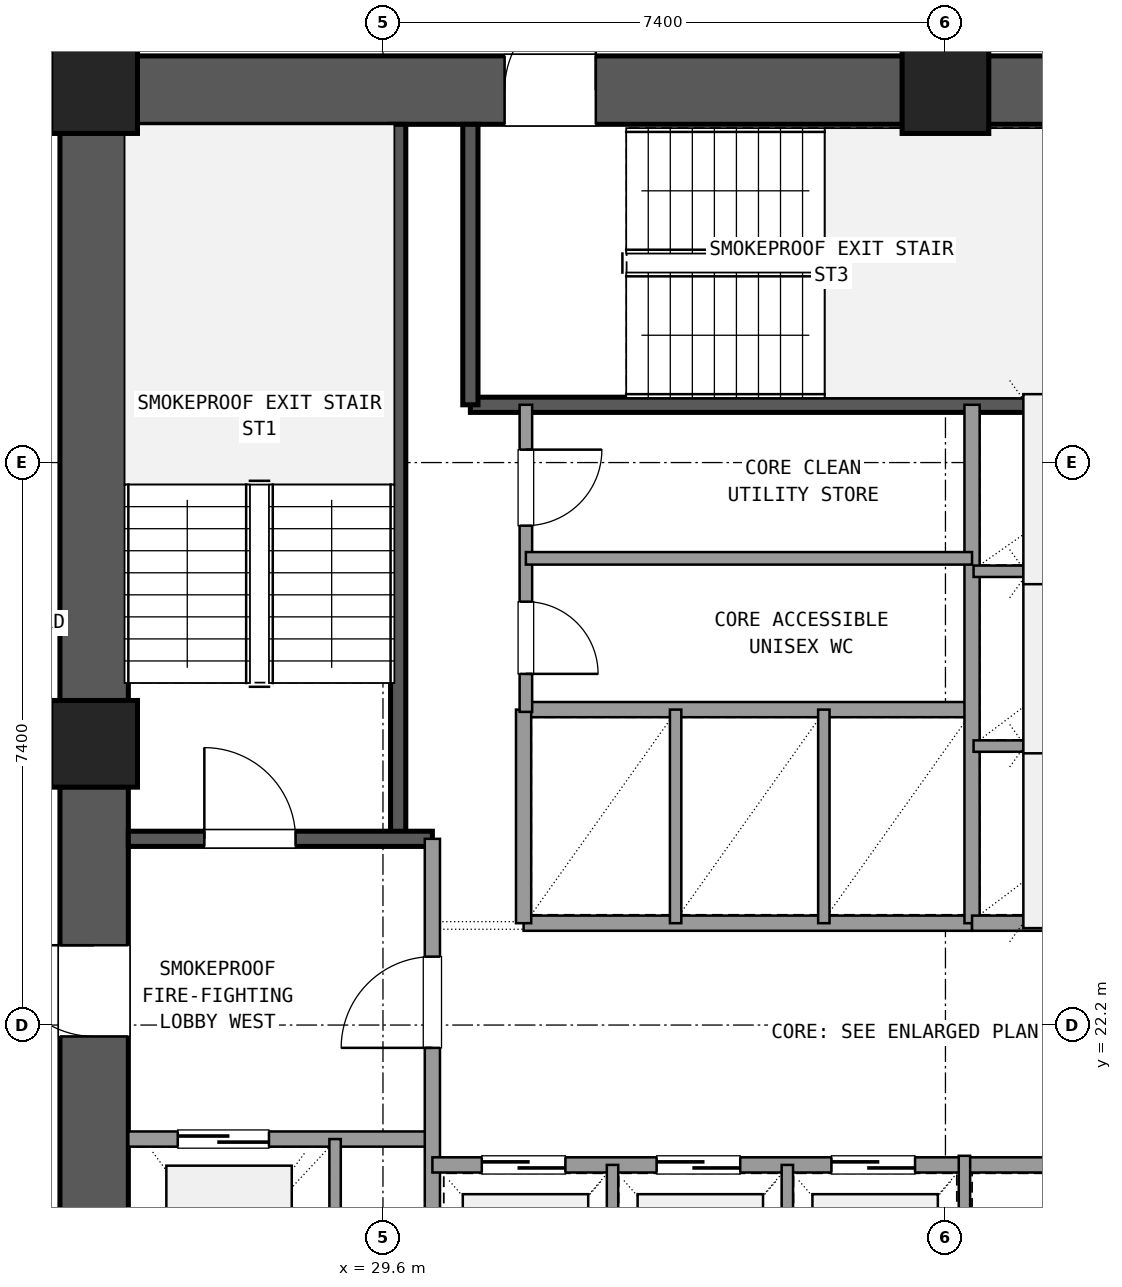
"""IFC4 building model, lengths in metres.
Left out: names, types, materials, properties, quantities, classifications, styles, units other than length and angle.
Written with IfcOpenShell. Run it as: python <this file> out.ifc"""

import sys

from ifc_helpers import new_model, si_unit, direction, frame, frame_2d, origin, origin_2d, place, context, subcontext, project, spatial, rectangle, extrude, element, fill, save


model = new_model("IFC4")
c1 = context("Model", 3, precision=1e-05, world=origin(), true_north=direction((0.0, 1.0)))
c2 = subcontext(c1, "Body", "Model", "MODEL_VIEW")
j1 = project(units=[si_unit("LENGTHUNIT", "METRE"), si_unit("PLANEANGLEUNIT", "RADIAN")], contexts=[c1])
p1 = place(None, origin())
s1 = spatial("IfcSite", under=j1, at=p1, CompositionType="ELEMENT")
p2 = place(p1, origin())
s2 = spatial("IfcBuilding", under=s1, at=p2, CompositionType="ELEMENT")
p3 = place(p2, frame((0.0, 0.0, 34.74)))
s3 = spatial("IfcBuildingStorey", under=s2, at=p3, CompositionType="ELEMENT", Elevation=34.74)
for number, where, z_axis, x_axis in (
    (1, (37.0, 34.5, 0.0), (0.0, 0.0, 1.0), (1.0, 0.0, 0.0)),
    (2, (25.8, 34.5, 0.0), (0.0, 0.0, 1.0), (1.0, 0.0, 0.0)),
    (3, (25.8, 25.9, 0.0), (0.0, 0.0, 1.0), (1.0, 0.0, 0.0)),
):
    element("IfcColumn", number, at=place(p3, frame(where, z_axis=z_axis, x_axis=x_axis)), inside=s3, PredefinedType="COLUMN", context=c2, shape_type="SweptSolid", body=[
        extrude(rectangle(XDim=1.14, YDim=1.14, at=origin_2d()), origin(), (0.0, 0.0, 1.0), 3.6),
    ])
p4 = place(p3, frame((47.635, 34.5, 0.0), z_axis=(0.0, 0.0, 1.0), x_axis=(-1.0, 0.0, 0.0)))
e4 = element("IfcWall", 4, at=p4, inside=s3, PredefinedType="SHEAR", context=c2, shape_type="SweptSolid", body=[
    extrude(rectangle(XDim=10.07, YDim=0.9, at=frame_2d((5.035, 0.0))), origin(), (0.0, 0.0, 1.0), 3.32),
])
p5 = place(p4, frame((4.535, 0.0, 0.0)))
e5 = element("IfcOpeningElement", 5, at=p5, cuts=e4, PredefinedType="OPENING", context=c2, shape_type="SweptSolid", body=[
    extrude(rectangle(XDim=1.6, YDim=2.2, at=frame_2d((0.8, 1.1))), frame((0.0, 0.46, 0.0), z_axis=(0.0, -1.0, 0.0), x_axis=(1.0, 0.0, 0.0)), (0.0, 0.0, 1.0), 0.92),
])
p6 = place(p3, frame((36.435, 34.5, 0.0), z_axis=(0.0, 0.0, 1.0), x_axis=(-1.0, 0.0, 0.0)))
e6 = element("IfcWall", 6, at=p6, inside=s3, PredefinedType="SHEAR", context=c2, shape_type="SweptSolid", body=[
    extrude(rectangle(XDim=10.07, YDim=0.9, at=frame_2d((5.035, 0.0))), origin(), (0.0, 0.0, 1.0), 3.32),
])
p7 = place(p6, frame((4.035, 0.0, 0.0)))
e7 = element("IfcOpeningElement", 7, at=p7, cuts=e6, PredefinedType="OPENING", context=c2, shape_type="SweptSolid", body=[
    extrude(rectangle(XDim=1.2, YDim=2.15, at=frame_2d((0.6, 1.075))), frame((0.0, 0.46, 0.0), z_axis=(0.0, -1.0, 0.0), x_axis=(1.0, 0.0, 0.0)), (0.0, 0.0, 1.0), 0.92),
])
p8 = place(p3, frame((25.8, 33.935, 0.0), z_axis=(0.0, 0.0, 1.0), x_axis=(0.0, -1.0, 0.0)))
e8 = element("IfcWall", 8, at=p8, inside=s3, PredefinedType="SHEAR", context=c2, shape_type="SweptSolid", body=[
    extrude(rectangle(XDim=7.47, YDim=0.9, at=frame_2d((3.735, 0.0))), origin(), (0.0, 0.0, 1.0), 3.32),
])
p9 = place(p3, frame((25.8, 25.335, 0.0), z_axis=(0.0, 0.0, 1.0), x_axis=(0.0, -1.0, 0.0)))
e9 = element("IfcWall", 9, at=p9, inside=s3, PredefinedType="SHEAR", context=c2, shape_type="SweptSolid", body=[
    extrude(rectangle(XDim=7.47, YDim=0.9, at=frame_2d((3.735, 0.0))), origin(), (0.0, 0.0, 1.0), 3.32),
])
p10 = place(p9, frame((2.085, 0.0, 0.0)))
e10 = element("IfcOpeningElement", 10, at=p10, cuts=e9, PredefinedType="OPENING", context=c2, shape_type="SweptSolid", body=[
    extrude(rectangle(XDim=1.2, YDim=2.15, at=frame_2d((0.6, 1.075))), frame((0.0, 0.46, 0.0), z_axis=(0.0, -1.0, 0.0), x_axis=(1.0, 0.0, 0.0)), (0.0, 0.0, 1.0), 0.92),
])
p11 = place(p3, frame((29.8, 24.65, 0.0), z_axis=(0.0, 0.0, 1.0), x_axis=(0.0, 1.0, 0.0)))
e11 = element("IfcWall", 11, at=p11, inside=s3, PredefinedType="SHEAR", context=c2, shape_type="SweptSolid", body=[
    extrude(rectangle(XDim=9.4, YDim=0.2, at=frame_2d((4.7, 0.0))), origin(), (0.0, 0.0, 1.0), 3.32),
])
p12 = place(p3, frame((26.25, 24.65, 0.0), z_axis=(0.0, 0.0, 1.0), x_axis=(1.0, 0.0, 0.0)))
e12 = element("IfcWall", 12, at=p12, inside=s3, PredefinedType="SHEAR", context=c2, shape_type="SweptSolid", body=[
    extrude(rectangle(XDim=4.0, YDim=0.2, at=frame_2d((2.0, 0.0))), origin(), (0.0, 0.0, 1.0), 3.32),
])
p13 = place(p12, frame((1.0, 0.0, 0.0)))
e13 = element("IfcOpeningElement", 13, at=p13, cuts=e12, PredefinedType="OPENING", context=c2, shape_type="SweptSolid", body=[
    extrude(rectangle(XDim=1.2, YDim=2.15, at=frame_2d((0.6, 1.075))), frame((0.0, 0.11, 0.0), z_axis=(0.0, -1.0, 0.0), x_axis=(1.0, 0.0, 0.0)), (0.0, 0.0, 1.0), 0.22),
])
p14 = place(p3, frame((30.75, 30.36, 0.0), z_axis=(0.0, 0.0, 1.0), x_axis=(1.0, 0.0, 0.0)))
e14 = element("IfcWall", 14, at=p14, inside=s3, PredefinedType="SHEAR", context=c2, shape_type="SweptSolid", body=[
    extrude(rectangle(XDim=9.5, YDim=0.2, at=frame_2d((4.75, 0.0))), origin(), (0.0, 0.0, 1.0), 3.32),
])
p15 = place(p3, frame((30.75, 30.36, 0.0), z_axis=(0.0, 0.0, 1.0), x_axis=(0.0, 1.0, 0.0)))
e15 = element("IfcWall", 15, at=p15, inside=s3, PredefinedType="SHEAR", context=c2, shape_type="SweptSolid", body=[
    extrude(rectangle(XDim=3.69, YDim=0.2, at=frame_2d((1.845, 0.0))), origin(), (0.0, 0.0, 1.0), 3.32),
])
p16 = place(p3, frame((26.25, 20.7, 0.0), z_axis=(0.0, 0.0, 1.0), x_axis=(1.0, 0.0, 0.0)))
e16 = element("IfcWall", 16, at=p16, inside=s3, PredefinedType="SOLIDWALL", context=c2, shape_type="SweptSolid", body=[
    extrude(rectangle(XDim=4.0, YDim=0.2, at=frame_2d((2.0, 0.0))), origin(), (0.0, 0.0, 1.0), 2.61),
])
p17 = place(p16, frame((0.65, 0.0, 0.0)))
e17 = element("IfcOpeningElement", 17, at=p17, cuts=e16, PredefinedType="OPENING", context=c2, shape_type="SweptSolid", body=[
    extrude(rectangle(XDim=1.2, YDim=2.15, at=frame_2d((0.6, 1.075))), frame((0.0, 0.11, 0.0), z_axis=(0.0, -1.0, 0.0), x_axis=(1.0, 0.0, 0.0)), (0.0, 0.0, 1.0), 0.22),
])
p18 = place(p3, frame((30.25, 17.75, 0.0), z_axis=(0.0, 0.0, 1.0), x_axis=(0.0, 1.0, 0.0)))
e18 = element("IfcWall", 18, at=p18, inside=s3, PredefinedType="SOLIDWALL", context=c2, shape_type="SweptSolid", body=[
    extrude(rectangle(XDim=6.9, YDim=0.2, at=frame_2d((3.45, 0.0))), origin(), (0.0, 0.0, 1.0), 2.61),
])
p19 = place(p18, frame((4.15, 0.0, 0.0)))
e19 = element("IfcOpeningElement", 19, at=p19, cuts=e18, PredefinedType="OPENING", context=c2, shape_type="SweptSolid", body=[
    extrude(rectangle(XDim=1.2, YDim=2.15, at=frame_2d((0.6, 1.075))), frame((0.0, 0.11, 0.0), z_axis=(0.0, -1.0, 0.0), x_axis=(1.0, 0.0, 0.0)), (0.0, 0.0, 1.0), 0.22),
])
p20 = place(p3, frame((28.97, 17.75, 0.0), z_axis=(0.0, 0.0, 1.0), x_axis=(0.0, 1.0, 0.0)))
e20 = element("IfcWall", 20, at=p20, inside=s3, PredefinedType="PARTITIONING", context=c2, shape_type="SweptSolid", body=[
    extrude(rectangle(XDim=2.95, YDim=0.15, at=frame_2d((1.475, 0.0))), origin(), (0.0, 0.0, 1.0), 2.61),
])
p21 = place(p3, frame((30.25, 20.36, 0.0), z_axis=(0.0, 0.0, 1.0), x_axis=(1.0, 0.0, 0.0)))
e21 = element("IfcWall", 21, at=p21, inside=s3, PredefinedType="SOLIDWALL", context=c2, shape_type="SweptSolid", body=[
    extrude(rectangle(XDim=7.0, YDim=0.2, at=frame_2d((3.5, 0.0))), origin(), (0.0, 0.0, 1.0), 2.61),
])
p22 = place(p21, frame((0.65, 0.0, 0.0)))
e22 = element("IfcOpeningElement", 22, at=p22, cuts=e21, PredefinedType="OPENING", context=c2, shape_type="SweptSolid", body=[
    extrude(rectangle(XDim=1.1, YDim=2.15, at=frame_2d((0.55, 1.075))), frame((0.0, 0.11, 0.0), z_axis=(0.0, -1.0, 0.0), x_axis=(1.0, 0.0, 0.0)), (0.0, 0.0, 1.0), 0.22),
])
p23 = place(p21, frame((2.95, 0.0, 0.0)))
e23 = element("IfcOpeningElement", 23, at=p23, cuts=e21, PredefinedType="OPENING", context=c2, shape_type="SweptSolid", body=[
    extrude(rectangle(XDim=1.1, YDim=2.15, at=frame_2d((0.55, 1.075))), frame((0.0, 0.11, 0.0), z_axis=(0.0, -1.0, 0.0), x_axis=(1.0, 0.0, 0.0)), (0.0, 0.0, 1.0), 0.22),
])
p24 = place(p21, frame((5.25, 0.0, 0.0)))
e24 = element("IfcOpeningElement", 24, at=p24, cuts=e21, PredefinedType="OPENING", context=c2, shape_type="SweptSolid", body=[
    extrude(rectangle(XDim=1.1, YDim=2.15, at=frame_2d((0.55, 1.075))), frame((0.0, 0.11, 0.0), z_axis=(0.0, -1.0, 0.0), x_axis=(1.0, 0.0, 0.0)), (0.0, 0.0, 1.0), 0.22),
])
for number, where, z_axis, x_axis in (
    (25, (32.62, 17.75, 0.0), (0.0, 0.0, 1.0), (0.0, 1.0, 0.0)),
    (26, (34.92, 17.75, 0.0), (0.0, 0.0, 1.0), (0.0, 1.0, 0.0)),
):
    element("IfcWall", number, at=place(p3, frame(where, z_axis=z_axis, x_axis=x_axis)), inside=s3, PredefinedType="PARTITIONING", context=c2, shape_type="SweptSolid", body=[
        extrude(rectangle(XDim=2.61, YDim=0.15, at=frame_2d((1.305, 0.0))), origin(), (0.0, 0.0, 1.0), 2.61),
    ])
p25 = place(p3, frame((37.25, 20.36, 0.0), z_axis=(0.0, 0.0, 1.0), x_axis=(1.0, 0.0, 0.0)))
e27 = element("IfcWall", 27, at=p25, inside=s3, PredefinedType="SOLIDWALL", context=c2, shape_type="SweptSolid", body=[
    extrude(rectangle(XDim=6.1, YDim=0.2, at=frame_2d((3.05, 0.0))), origin(), (0.0, 0.0, 1.0), 2.61),
])
p26 = place(p3, frame((37.25, 17.75, 0.0), z_axis=(0.0, 0.0, 1.0), x_axis=(0.0, 1.0, 0.0)))
e28 = element("IfcWall", 28, at=p26, inside=s3, PredefinedType="PARTITIONING", context=c2, shape_type="SweptSolid", body=[
    extrude(rectangle(XDim=2.73, YDim=0.15, at=frame_2d((1.365, 0.0))), origin(), (0.0, 0.0, 1.0), 2.61),
])
for number, where, z_axis, x_axis in (
    (29, (31.45, 23.54, 0.0), (0.0, 0.0, 1.0), (1.0, 0.0, 0.0)),
    (30, (31.45, 26.35, 0.0), (0.0, 0.0, 1.0), (1.0, 0.0, 0.0)),
):
    element("IfcWall", number, at=place(p3, frame(where, z_axis=z_axis, x_axis=x_axis)), inside=s3, PredefinedType="SOLIDWALL", context=c2, shape_type="SweptSolid", body=[
        extrude(rectangle(XDim=5.9, YDim=0.2, at=frame_2d((2.95, 0.0))), origin(), (0.0, 0.0, 1.0), 2.61),
    ])
p27 = place(p3, frame((31.45, 23.54, 0.0), z_axis=(0.0, 0.0, 1.0), x_axis=(0.0, 1.0, 0.0)))
e31 = element("IfcWall", 31, at=p27, inside=s3, PredefinedType="SOLIDWALL", context=c2, shape_type="SweptSolid", body=[
    extrude(rectangle(XDim=2.81, YDim=0.2, at=frame_2d((1.405, 0.0))), origin(), (0.0, 0.0, 1.0), 2.61),
])
for number, where, z_axis, x_axis in (
    (32, (33.45, 23.54, 0.0), (0.0, 0.0, 1.0), (0.0, 1.0, 0.0)),
    (33, (35.4, 23.54, 0.0), (0.0, 0.0, 1.0), (0.0, 1.0, 0.0)),
):
    element("IfcWall", number, at=place(p3, frame(where, z_axis=z_axis, x_axis=x_axis)), inside=s3, PredefinedType="PARTITIONING", context=c2, shape_type="SweptSolid", body=[
        extrude(rectangle(XDim=2.81, YDim=0.15, at=frame_2d((1.405, 0.0))), origin(), (0.0, 0.0, 1.0), 2.61),
    ])
p28 = place(p3, frame((37.35, 23.54, 0.0), z_axis=(0.0, 0.0, 1.0), x_axis=(0.0, 1.0, 0.0)))
e34 = element("IfcWall", 34, at=p28, inside=s3, PredefinedType="SOLIDWALL", context=c2, shape_type="SweptSolid", body=[
    extrude(rectangle(XDim=6.82, YDim=0.2, at=frame_2d((3.41, 0.0))), origin(), (0.0, 0.0, 1.0), 2.61),
])
p29 = place(p3, frame((37.35, 23.54, 0.0), z_axis=(0.0, 0.0, 1.0), x_axis=(1.0, 0.0, 0.0)))
e35 = element("IfcWall", 35, at=p29, inside=s3, PredefinedType="SOLIDWALL", context=c2, shape_type="SweptSolid", body=[
    extrude(rectangle(XDim=3.05, YDim=0.2, at=frame_2d((1.525, 0.0))), origin(), (0.0, 0.0, 1.0), 2.61),
])
for number, where, z_axis, x_axis in (
    (36, (37.37, 25.87, 0.0), (0.0, 0.0, 1.0), (1.0, 0.0, 0.0)),
    (37, (37.37, 28.17, 0.0), (0.0, 0.0, 1.0), (1.0, 0.0, 0.0)),
):
    element("IfcWall", number, at=place(p3, frame(where, z_axis=z_axis, x_axis=x_axis)), inside=s3, PredefinedType="PARTITIONING", context=c2, shape_type="SweptSolid", body=[
        extrude(rectangle(XDim=3.01, YDim=0.15, at=frame_2d((1.505, 0.0))), origin(), (0.0, 0.0, 1.0), 2.61),
    ])
p30 = place(p3, frame((31.48, 26.32, 0.0), z_axis=(0.0, 0.0, 1.0), x_axis=(0.0, 1.0, 0.0)))
e38 = element("IfcWall", 38, at=p30, inside=s3, PredefinedType="PLUMBINGWALL", context=c2, shape_type="SweptSolid", body=[
    extrude(rectangle(XDim=4.04, YDim=0.165, at=frame_2d((2.02, 0.0))), origin(), (0.0, 0.0, 1.0), 2.61),
])
p31 = place(p30, frame((0.5, 0.0, 0.0)))
e39 = element("IfcOpeningElement", 39, at=p31, cuts=e38, PredefinedType="OPENING", context=c2, shape_type="SweptSolid", body=[
    extrude(rectangle(XDim=0.95, YDim=2.1, at=frame_2d((0.475, 1.05))), frame((0.0, 0.093, 0.0), z_axis=(0.0, -1.0, 0.0), x_axis=(1.0, 0.0, 0.0)), (0.0, 0.0, 1.0), 0.185),
])
p32 = place(p30, frame((2.45, 0.0, 0.0)))
e40 = element("IfcOpeningElement", 40, at=p32, cuts=e38, PredefinedType="OPENING", context=c2, shape_type="SweptSolid", body=[
    extrude(rectangle(XDim=1.0, YDim=2.15, at=frame_2d((0.5, 1.075))), frame((0.0, 0.093, 0.0), z_axis=(0.0, -1.0, 0.0), x_axis=(1.0, 0.0, 0.0)), (0.0, 0.0, 1.0), 0.185),
])
p33 = place(p3, frame((31.48, 28.34, 0.0), z_axis=(0.0, 0.0, 1.0), x_axis=(1.0, 0.0, 0.0)))
e41 = element("IfcWall", 41, at=p33, inside=s3, PredefinedType="PLUMBINGWALL", context=c2, shape_type="SweptSolid", body=[
    extrude(rectangle(XDim=5.87, YDim=0.165, at=frame_2d((2.935, 0.0))), origin(), (0.0, 0.0, 1.0), 2.61),
])
p34 = place(p3, frame((37.0, 34.95, 0.0), z_axis=(0.0, 0.0, 1.0), x_axis=(0.0, 1.0, 0.0)))
e42 = element("IfcWall", 42, at=p34, inside=s3, PredefinedType="PARTITIONING", context=c2, shape_type="SweptSolid", body=[
    extrude(rectangle(XDim=2.7, YDim=0.18, at=frame_2d((1.35, 0.0))), origin(), (0.0, 0.0, 1.0), 2.61),
])
p35 = place(p34, frame((0.35, 0.0, 0.0)))
e43 = element("IfcOpeningElement", 43, at=p35, cuts=e42, PredefinedType="OPENING", context=c2, shape_type="SweptSolid", body=[
    extrude(rectangle(XDim=2.0, YDim=2.2, at=frame_2d((1.0, 1.1))), frame((0.0, 0.1, 0.0), z_axis=(0.0, -1.0, 0.0), x_axis=(1.0, 0.0, 0.0)), (0.0, 0.0, 1.0), 0.2),
])
p36 = place(p13, origin())
e44 = element("IfcDoor", 44, at=p36, inside=s3, OperationType="SINGLE_SWING_LEFT", PredefinedType="DOOR", context=c2, shape_type="SweptSolid", body=[
    extrude(rectangle(XDim=1.2, YDim=2.15, at=frame_2d((0.6, 1.075))), frame((0.0, 0.025, 0.0), z_axis=(0.0, -1.0, 0.0), x_axis=(1.0, 0.0, 0.0)), (0.0, 0.0, 1.0), 0.05),
])
fill(e13, e44)
p37 = place(p17, origin())
e45 = element("IfcDoor", 45, at=p37, inside=s3, OperationType="SLIDING_TO_LEFT", PredefinedType="DOOR", context=c2, shape_type="SweptSolid", body=[
    extrude(rectangle(XDim=1.2, YDim=2.15, at=frame_2d((0.6, 1.075))), frame((0.0, 0.025, 0.0), z_axis=(0.0, -1.0, 0.0), x_axis=(1.0, 0.0, 0.0)), (0.0, 0.0, 1.0), 0.05),
])
fill(e17, e45)
p38 = place(p19, origin())
e46 = element("IfcDoor", 46, at=p38, inside=s3, OperationType="SINGLE_SWING_LEFT", PredefinedType="DOOR", context=c2, shape_type="SweptSolid", body=[
    extrude(rectangle(XDim=1.2, YDim=2.15, at=frame_2d((0.6, 1.075))), frame((0.0, 0.025, 0.0), z_axis=(0.0, -1.0, 0.0), x_axis=(1.0, 0.0, 0.0)), (0.0, 0.0, 1.0), 0.05),
])
fill(e19, e46)
p39 = place(p10, frame((1.2, 0.0, 0.0), z_axis=(0.0, 0.0, 1.0), x_axis=(-1.0, 0.0, 0.0)))
e47 = element("IfcDoor", 47, at=p39, inside=s3, OperationType="SINGLE_SWING_LEFT", PredefinedType="DOOR", context=c2, shape_type="SweptSolid", body=[
    extrude(rectangle(XDim=1.2, YDim=2.15, at=frame_2d((0.6, 1.075))), frame((0.0, 0.025, 0.0), z_axis=(0.0, -1.0, 0.0), x_axis=(1.0, 0.0, 0.0)), (0.0, 0.0, 1.0), 0.05),
])
fill(e10, e47)
p40 = place(p7, frame((1.2, 0.0, 0.0), z_axis=(0.0, 0.0, 1.0), x_axis=(-1.0, 0.0, 0.0)))
e48 = element("IfcDoor", 48, at=p40, inside=s3, OperationType="SINGLE_SWING_LEFT", PredefinedType="DOOR", context=c2, shape_type="SweptSolid", body=[
    extrude(rectangle(XDim=1.2, YDim=2.15, at=frame_2d((0.6, 1.075))), frame((0.0, 0.025, 0.0), z_axis=(0.0, -1.0, 0.0), x_axis=(1.0, 0.0, 0.0)), (0.0, 0.0, 1.0), 0.05),
])
fill(e7, e48)
p41 = place(p22, origin())
e49 = element("IfcDoor", 49, at=p41, inside=s3, OperationType="SLIDING_TO_LEFT", PredefinedType="DOOR", context=c2, shape_type="SweptSolid", body=[
    extrude(rectangle(XDim=1.1, YDim=2.15, at=frame_2d((0.55, 1.075))), frame((0.0, 0.025, 0.0), z_axis=(0.0, -1.0, 0.0), x_axis=(1.0, 0.0, 0.0)), (0.0, 0.0, 1.0), 0.05),
])
fill(e22, e49)
p42 = place(p23, origin())
e50 = element("IfcDoor", 50, at=p42, inside=s3, OperationType="SLIDING_TO_LEFT", PredefinedType="DOOR", context=c2, shape_type="SweptSolid", body=[
    extrude(rectangle(XDim=1.1, YDim=2.15, at=frame_2d((0.55, 1.075))), frame((0.0, 0.025, 0.0), z_axis=(0.0, -1.0, 0.0), x_axis=(1.0, 0.0, 0.0)), (0.0, 0.0, 1.0), 0.05),
])
fill(e23, e50)
p43 = place(p24, origin())
e51 = element("IfcDoor", 51, at=p43, inside=s3, OperationType="SLIDING_TO_LEFT", PredefinedType="DOOR", context=c2, shape_type="SweptSolid", body=[
    extrude(rectangle(XDim=1.1, YDim=2.15, at=frame_2d((0.55, 1.075))), frame((0.0, 0.025, 0.0), z_axis=(0.0, -1.0, 0.0), x_axis=(1.0, 0.0, 0.0)), (0.0, 0.0, 1.0), 0.05),
])
fill(e24, e51)
p44 = place(p31, frame((0.95, 0.0, 0.0), z_axis=(0.0, 0.0, 1.0), x_axis=(-1.0, 0.0, 0.0)))
e52 = element("IfcDoor", 52, at=p44, inside=s3, OperationType="SINGLE_SWING_LEFT", PredefinedType="DOOR", context=c2, shape_type="SweptSolid", body=[
    extrude(rectangle(XDim=0.95, YDim=2.1, at=frame_2d((0.475, 1.05))), frame((0.0, 0.025, 0.0), z_axis=(0.0, -1.0, 0.0), x_axis=(1.0, 0.0, 0.0)), (0.0, 0.0, 1.0), 0.05),
])
fill(e39, e52)
p45 = place(p32, frame((1.0, 0.0, 0.0), z_axis=(0.0, 0.0, 1.0), x_axis=(-1.0, 0.0, 0.0)))
e53 = element("IfcDoor", 53, at=p45, inside=s3, OperationType="SINGLE_SWING_RIGHT", PredefinedType="DOOR", context=c2, shape_type="SweptSolid", body=[
    extrude(rectangle(XDim=1.0, YDim=2.15, at=frame_2d((0.5, 1.075))), frame((0.0, 0.025, 0.0), z_axis=(0.0, -1.0, 0.0), x_axis=(1.0, 0.0, 0.0)), (0.0, 0.0, 1.0), 0.05),
])
fill(e40, e53)
save(model, sys.argv[1])
